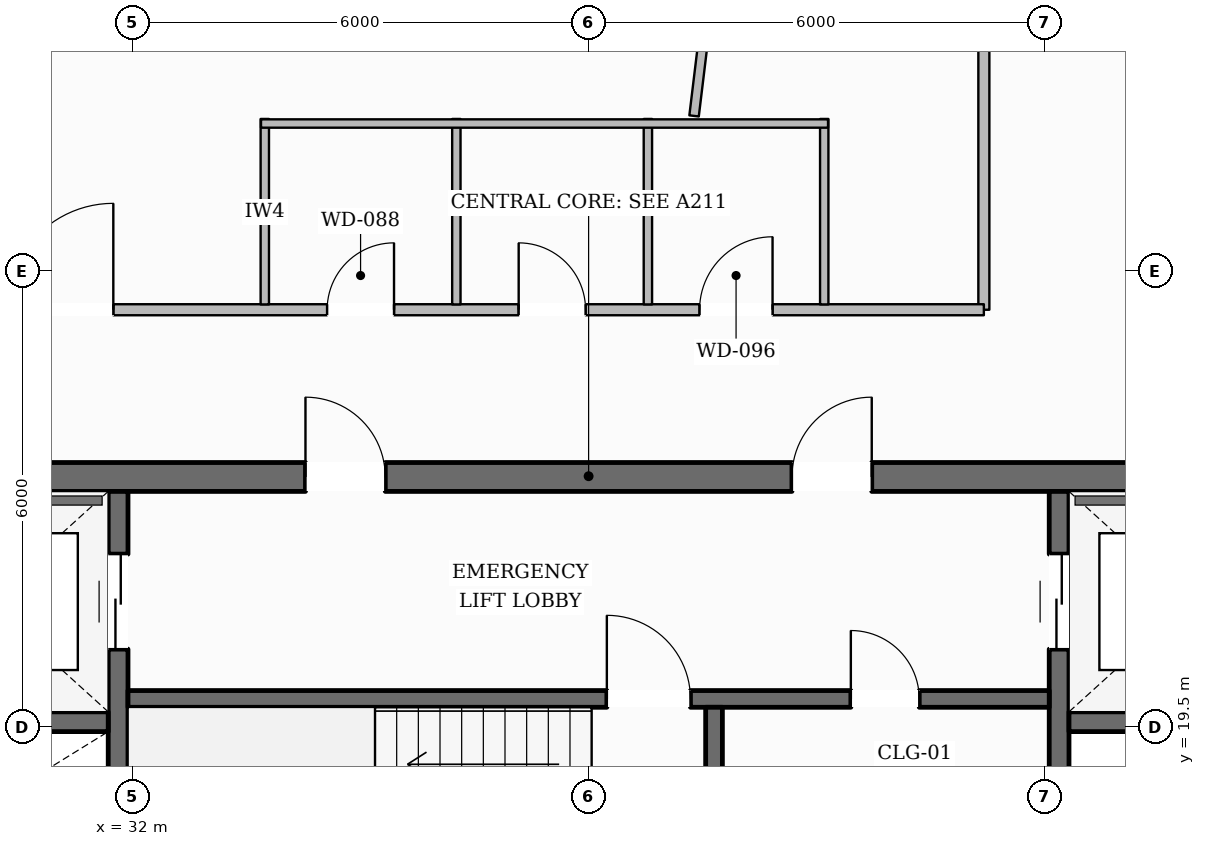
"""IFC4 building model, lengths in metres.
Left out: names, types, materials, properties, quantities, classifications, styles, units other than length and angle.
Written with IfcOpenShell. Run it as: python <this file> out.ifc"""

import sys

from ifc_helpers import new_model, si_unit, direction, frame, frame_2d, origin, place, context, subcontext, project, spatial, rectangle, extrude, element, fill, save


model = new_model("IFC4")
c1 = context("Model", 3, precision=1e-05, world=origin(), true_north=direction((0.0, 1.0)))
c2 = subcontext(c1, "Body", "Model", "MODEL_VIEW")
j1 = project(units=[si_unit("LENGTHUNIT", "METRE"), si_unit("PLANEANGLEUNIT", "RADIAN")], contexts=[c1])
p1 = place(None, origin())
s1 = spatial("IfcSite", under=j1, at=p1, CompositionType="ELEMENT")
p2 = place(p1, origin())
s2 = spatial("IfcBuilding", under=s1, at=p2, CompositionType="ELEMENT")
p3 = place(p2, frame((0.0, 0.0, 251.05)))
s3 = spatial("IfcBuildingStorey", under=s2, at=p3, CompositionType="ELEMENT", Elevation=251.05)
p4 = place(p3, frame((28.1, 22.79, 0.0), z_axis=(0.0, 0.0, 1.0), x_axis=(1.0, 0.0, 0.0)))
e1 = element("IfcWall", 1, at=p4, inside=s3, PredefinedType="SOLIDWALL", context=c2, shape_type="SweptSolid", body=[
    extrude(rectangle(XDim=19.8, YDim=0.38, at=frame_2d((9.9, 0.0))), origin(), (0.0, 0.0, 1.0), 3.61),
])
p5 = place(p4, frame((6.175, 0.0, 0.0)))
e2 = element("IfcOpeningElement", 2, at=p5, cuts=e1, PredefinedType="OPENING", context=c2, shape_type="SweptSolid", body=[
    extrude(rectangle(XDim=1.05, YDim=2.15, at=frame_2d((0.525, 1.075))), frame((0.0, 0.2, 0.0), z_axis=(0.0, -1.0, 0.0), x_axis=(1.0, 0.0, 0.0)), (0.0, 0.0, 1.0), 0.4),
])
p6 = place(p4, frame((12.575, 0.0, 0.0)))
e3 = element("IfcOpeningElement", 3, at=p6, cuts=e1, PredefinedType="OPENING", context=c2, shape_type="SweptSolid", body=[
    extrude(rectangle(XDim=1.05, YDim=2.15, at=frame_2d((0.525, 1.075))), frame((0.0, 0.2, 0.0), z_axis=(0.0, -1.0, 0.0), x_axis=(1.0, 0.0, 0.0)), (0.0, 0.0, 1.0), 0.4),
])
p7 = place(p3, frame((31.81, 9.6, 0.0), z_axis=(0.0, 0.0, 1.0), x_axis=(0.0, 1.0, 0.0)))
e4 = element("IfcWall", 4, at=p7, inside=s3, PredefinedType="SHEAR", context=c2, shape_type="SweptSolid", body=[
    extrude(rectangle(XDim=13.0, YDim=0.26, at=frame_2d((6.5, 0.0))), origin(), (0.0, 0.0, 1.0), 3.61),
])
p8 = place(p7, frame((10.925, 0.0, 0.0)))
e5 = element("IfcOpeningElement", 5, at=p8, cuts=e4, PredefinedType="OPENING", context=c2, shape_type="SweptSolid", body=[
    extrude(rectangle(XDim=1.25, YDim=2.25, at=frame_2d((0.625, 1.125))), frame((0.0, 0.14, 0.0), z_axis=(0.0, -1.0, 0.0), x_axis=(1.0, 0.0, 0.0)), (0.0, 0.0, 1.0), 0.28),
])
p9 = place(p3, frame((44.19, 9.6, 0.0), z_axis=(0.0, 0.0, 1.0), x_axis=(0.0, 1.0, 0.0)))
e6 = element("IfcWall", 6, at=p9, inside=s3, PredefinedType="SHEAR", context=c2, shape_type="SweptSolid", body=[
    extrude(rectangle(XDim=13.0, YDim=0.26, at=frame_2d((6.5, 0.0))), origin(), (0.0, 0.0, 1.0), 3.61),
])
p10 = place(p9, frame((10.925, 0.0, 0.0)))
e7 = element("IfcOpeningElement", 7, at=p10, cuts=e6, PredefinedType="OPENING", context=c2, shape_type="SweptSolid", body=[
    extrude(rectangle(XDim=1.25, YDim=2.25, at=frame_2d((0.625, 1.125))), frame((0.0, 0.14, 0.0), z_axis=(0.0, -1.0, 0.0), x_axis=(1.0, 0.0, 0.0)), (0.0, 0.0, 1.0), 0.28),
])
for number, where, z_axis, x_axis in (
    (8, (28.48, 19.57, 0.0), (0.0, 0.0, 1.0), (1.0, 0.0, 0.0)),
    (9, (44.32, 19.57, 0.0), (0.0, 0.0, 1.0), (1.0, 0.0, 0.0)),
):
    element("IfcWall", number, at=place(p3, frame(where, z_axis=z_axis, x_axis=x_axis)), inside=s3, PredefinedType="SHEAR", context=c2, shape_type="SweptSolid", body=[
        extrude(rectangle(XDim=3.2, YDim=0.26, at=frame_2d((1.6, 0.0))), origin(), (0.0, 0.0, 1.0), 3.61),
    ])
p11 = place(p3, frame((31.94, 19.87, 0.0), z_axis=(0.0, 0.0, 1.0), x_axis=(1.0, 0.0, 0.0)))
e10 = element("IfcWall", 10, at=p11, inside=s3, PredefinedType="SOLIDWALL", context=c2, shape_type="SweptSolid", body=[
    extrude(rectangle(XDim=12.12, YDim=0.22, at=frame_2d((6.06, 0.0))), origin(), (0.0, 0.0, 1.0), 3.61),
])
p12 = place(p11, frame((6.3, 0.0, 0.0)))
e11 = element("IfcOpeningElement", 11, at=p12, cuts=e10, PredefinedType="OPENING", context=c2, shape_type="SweptSolid", body=[
    extrude(rectangle(XDim=1.1, YDim=2.15, at=frame_2d((0.55, 1.075))), frame((0.0, 0.12, 0.0), z_axis=(0.0, -1.0, 0.0), x_axis=(1.0, 0.0, 0.0)), (0.0, 0.0, 1.0), 0.24),
])
p13 = place(p11, frame((9.51, 0.0, 0.0)))
e12 = element("IfcOpeningElement", 12, at=p13, cuts=e10, PredefinedType="OPENING", context=c2, shape_type="SweptSolid", body=[
    extrude(rectangle(XDim=0.9, YDim=2.1, at=frame_2d((0.45, 1.05))), frame((0.0, 0.12, 0.0), z_axis=(0.0, -1.0, 0.0), x_axis=(1.0, 0.0, 0.0)), (0.0, 0.0, 1.0), 0.24),
])
p14 = place(p3, frame((39.65, 16.56, 0.0), z_axis=(0.0, 0.0, 1.0), x_axis=(0.0, 1.0, 0.0)))
e13 = element("IfcWall", 13, at=p14, inside=s3, PredefinedType="SOLIDWALL", context=c2, shape_type="SweptSolid", body=[
    extrude(rectangle(XDim=3.2, YDim=0.22, at=frame_2d((1.6, 0.0))), origin(), (0.0, 0.0, 1.0), 3.61),
])
p15 = place(p3, frame((16.214, 11.135, 0.0), z_axis=(0.0, 0.0, 1.0), x_axis=(0.49510347201, 0.868834018673, 0.0)))
e14 = element("IfcWall", 14, at=p15, inside=s3, PredefinedType="STANDARD", context=c2, shape_type="SweptSolid", body=[
    extrude(rectangle(XDim=37.643, YDim=0.35, at=frame_2d((18.822, 0.0))), origin(), (0.0, 0.0, 1.0), 3.196),
])
p16 = place(p15, frame((33.429, 0.0, 0.65)))
e15 = element("IfcOpeningElement", 15, at=p16, cuts=e14, PredefinedType="OPENING", context=c2, shape_type="SweptSolid", body=[
    extrude(rectangle(XDim=1.35, YDim=1.75, at=frame_2d((0.675, 0.875))), frame((0.0, 0.185, 0.0), z_axis=(0.0, -1.0, 0.0), x_axis=(1.0, 0.0, 0.0)), (0.0, 0.0, 1.0), 0.37),
])
p17 = place(p15, frame((27.315, 0.0, 0.65)))
e16 = element("IfcOpeningElement", 16, at=p17, cuts=e14, PredefinedType="OPENING", context=c2, shape_type="SweptSolid", body=[
    extrude(rectangle(XDim=1.35, YDim=1.75, at=frame_2d((0.675, 0.875))), frame((0.0, 0.185, 0.0), z_axis=(0.0, -1.0, 0.0), x_axis=(1.0, 0.0, 0.0)), (0.0, 0.0, 1.0), 0.37),
])
p18 = place(p15, frame((15.087, 0.0, 0.65)))
e17 = element("IfcOpeningElement", 17, at=p18, cuts=e14, PredefinedType="OPENING", context=c2, shape_type="SweptSolid", body=[
    extrude(rectangle(XDim=1.35, YDim=1.75, at=frame_2d((0.675, 0.875))), frame((0.0, 0.185, 0.0), z_axis=(0.0, -1.0, 0.0), x_axis=(1.0, 0.0, 0.0)), (0.0, 0.0, 1.0), 0.37),
])
p19 = place(p15, frame((8.973, 0.0, 0.65)))
e18 = element("IfcOpeningElement", 18, at=p19, cuts=e14, PredefinedType="OPENING", context=c2, shape_type="SweptSolid", body=[
    extrude(rectangle(XDim=1.35, YDim=1.75, at=frame_2d((0.675, 0.875))), frame((0.0, 0.185, 0.0), z_axis=(0.0, -1.0, 0.0), x_axis=(1.0, 0.0, 0.0)), (0.0, 0.0, 1.0), 0.37),
])
p20 = place(p15, frame((2.859, 0.0, 0.65)))
e19 = element("IfcOpeningElement", 19, at=p20, cuts=e14, PredefinedType="OPENING", context=c2, shape_type="SweptSolid", body=[
    extrude(rectangle(XDim=1.35, YDim=1.75, at=frame_2d((0.675, 0.875))), frame((0.0, 0.185, 0.0), z_axis=(0.0, -1.0, 0.0), x_axis=(1.0, 0.0, 0.0)), (0.0, 0.0, 1.0), 0.37),
])
p21 = place(p3, frame((41.284, 43.76, 0.0), z_axis=(0.0, 0.0, 1.0), x_axis=(0.50479404613, -0.863239810824, 0.0)))
e20 = element("IfcWall", 20, at=p21, inside=s3, PredefinedType="STANDARD", context=c2, shape_type="SweptSolid", body=[
    extrude(rectangle(XDim=38.372, YDim=0.35, at=frame_2d((19.186, 0.0))), origin(), (0.0, 0.0, 1.0), 3.196),
])
p22 = place(p21, frame((34.102, 0.0, 0.65)))
e21 = element("IfcOpeningElement", 21, at=p22, cuts=e20, PredefinedType="OPENING", context=c2, shape_type="SweptSolid", body=[
    extrude(rectangle(XDim=1.35, YDim=1.75, at=frame_2d((0.675, 0.875))), frame((0.0, 0.185, 0.0), z_axis=(0.0, -1.0, 0.0), x_axis=(1.0, 0.0, 0.0)), (0.0, 0.0, 1.0), 0.37),
])
p23 = place(p21, frame((27.864, 0.0, 0.65)))
e22 = element("IfcOpeningElement", 22, at=p23, cuts=e20, PredefinedType="OPENING", context=c2, shape_type="SweptSolid", body=[
    extrude(rectangle(XDim=1.35, YDim=1.75, at=frame_2d((0.675, 0.875))), frame((0.0, 0.185, 0.0), z_axis=(0.0, -1.0, 0.0), x_axis=(1.0, 0.0, 0.0)), (0.0, 0.0, 1.0), 0.37),
])
p24 = place(p21, frame((15.39, 0.0, 0.65)))
e23 = element("IfcOpeningElement", 23, at=p24, cuts=e20, PredefinedType="OPENING", context=c2, shape_type="SweptSolid", body=[
    extrude(rectangle(XDim=1.35, YDim=1.75, at=frame_2d((0.675, 0.875))), frame((0.0, 0.185, 0.0), z_axis=(0.0, -1.0, 0.0), x_axis=(1.0, 0.0, 0.0)), (0.0, 0.0, 1.0), 0.37),
])
p25 = place(p21, frame((9.153, 0.0, 0.65)))
e24 = element("IfcOpeningElement", 24, at=p25, cuts=e20, PredefinedType="OPENING", context=c2, shape_type="SweptSolid", body=[
    extrude(rectangle(XDim=1.35, YDim=1.75, at=frame_2d((0.675, 0.875))), frame((0.0, 0.185, 0.0), z_axis=(0.0, -1.0, 0.0), x_axis=(1.0, 0.0, 0.0)), (0.0, 0.0, 1.0), 0.37),
])
p26 = place(p21, frame((2.915, 0.0, 0.65)))
e25 = element("IfcOpeningElement", 25, at=p26, cuts=e20, PredefinedType="OPENING", context=c2, shape_type="SweptSolid", body=[
    extrude(rectangle(XDim=1.35, YDim=1.75, at=frame_2d((0.675, 0.875))), frame((0.0, 0.185, 0.0), z_axis=(0.0, -1.0, 0.0), x_axis=(1.0, 0.0, 0.0)), (0.0, 0.0, 1.0), 0.37),
])
p27 = place(p3, frame((43.2, 24.99, 0.0), z_axis=(0.0, 0.0, 1.0), x_axis=(0.0, 1.0, 0.0)))
e26 = element("IfcWall", 26, at=p27, inside=s3, PredefinedType="PARTITIONING", context=c2, shape_type="SweptSolid", body=[
    extrude(rectangle(XDim=9.41, YDim=0.145, at=frame_2d((4.705, 0.0))), origin(), (0.0, 0.0, 1.0), 3.61),
])
p28 = place(p27, frame((4.005, 0.0, 0.0)))
e27 = element("IfcOpeningElement", 27, at=p28, cuts=e26, PredefinedType="OPENING", context=c2, shape_type="SweptSolid", body=[
    extrude(rectangle(XDim=1.4, YDim=2.2, at=frame_2d((0.7, 1.1))), frame((0.0, 0.083, 0.0), z_axis=(0.0, -1.0, 0.0), x_axis=(1.0, 0.0, 0.0)), (0.0, 0.0, 1.0), 0.165),
])
p29 = place(p3, frame((26.09, 24.99, 0.0), z_axis=(0.0, 0.0, 1.0), x_axis=(1.0, 0.0, 0.0)))
e28 = element("IfcWall", 28, at=p29, inside=s3, PredefinedType="PARTITIONING", context=c2, shape_type="SweptSolid", body=[
    extrude(rectangle(XDim=17.11, YDim=0.145, at=frame_2d((8.555, 0.0))), origin(), (0.0, 0.0, 1.0), 3.61),
])
p30 = place(p29, frame((8.47, 0.0, 0.0)))
e29 = element("IfcOpeningElement", 29, at=p30, cuts=e28, PredefinedType="OPENING", context=c2, shape_type="SweptSolid", body=[
    extrude(rectangle(XDim=0.88, YDim=2.1, at=frame_2d((0.44, 1.05))), frame((0.0, 0.083, 0.0), z_axis=(0.0, -1.0, 0.0), x_axis=(1.0, 0.0, 0.0)), (0.0, 0.0, 1.0), 0.165),
])
p31 = place(p29, frame((10.99, 0.0, 0.0)))
e30 = element("IfcOpeningElement", 30, at=p31, cuts=e28, PredefinedType="OPENING", context=c2, shape_type="SweptSolid", body=[
    extrude(rectangle(XDim=0.88, YDim=2.1, at=frame_2d((0.44, 1.05))), frame((0.0, 0.083, 0.0), z_axis=(0.0, -1.0, 0.0), x_axis=(1.0, 0.0, 0.0)), (0.0, 0.0, 1.0), 0.165),
])
p32 = place(p29, frame((13.37, 0.0, 0.0)))
e31 = element("IfcOpeningElement", 31, at=p32, cuts=e28, PredefinedType="OPENING", context=c2, shape_type="SweptSolid", body=[
    extrude(rectangle(XDim=0.96, YDim=2.1, at=frame_2d((0.48, 1.05))), frame((0.0, 0.083, 0.0), z_axis=(0.0, -1.0, 0.0), x_axis=(1.0, 0.0, 0.0)), (0.0, 0.0, 1.0), 0.165),
])
p33 = place(p29, frame((4.257, 0.0, 0.0)))
e32 = element("IfcOpeningElement", 32, at=p33, cuts=e28, PredefinedType="OPENING", context=c2, shape_type="SweptSolid", body=[
    extrude(rectangle(XDim=1.4, YDim=2.2, at=frame_2d((0.7, 1.1))), frame((0.0, 0.083, 0.0), z_axis=(0.0, -1.0, 0.0), x_axis=(1.0, 0.0, 0.0)), (0.0, 0.0, 1.0), 0.165),
])
for number, where, z_axis, x_axis in (
    (33, (33.74, 25.06, 0.0), (0.0, 0.0, 1.0), (0.0, 1.0, 0.0)),
    (34, (36.26, 25.06, 0.0), (0.0, 0.0, 1.0), (0.0, 1.0, 0.0)),
    (35, (38.78, 25.06, 0.0), (0.0, 0.0, 1.0), (0.0, 1.0, 0.0)),
    (36, (41.1, 25.06, 0.0), (0.0, 0.0, 1.0), (0.0, 1.0, 0.0)),
):
    element("IfcWall", number, at=place(p3, frame(where, z_axis=z_axis, x_axis=x_axis)), inside=s3, PredefinedType="PLUMBINGWALL", context=c2, shape_type="SweptSolid", body=[
        extrude(rectangle(XDim=2.44, YDim=0.11, at=frame_2d((1.22, 0.0))), origin(), (0.0, 0.0, 1.0), 3.61),
    ])
p34 = place(p3, frame((33.69, 27.44, 0.0), z_axis=(0.0, 0.0, 1.0), x_axis=(1.0, 0.0, 0.0)))
e37 = element("IfcWall", 37, at=p34, inside=s3, PredefinedType="PLUMBINGWALL", context=c2, shape_type="SweptSolid", body=[
    extrude(rectangle(XDim=7.46, YDim=0.11, at=frame_2d((3.73, 0.0))), origin(), (0.0, 0.0, 1.0), 3.61),
])
p35 = place(p3, frame((39.387, 27.54, 0.0), z_axis=(0.0, 0.0, 1.0), x_axis=(0.12041169592, 0.99272404196, 0.0)))
e38 = element("IfcWall", 38, at=p35, inside=s3, PredefinedType="PARTITIONING", context=c2, shape_type="SweptSolid", body=[
    extrude(rectangle(XDim=15.521, YDim=0.125, at=frame_2d((7.76, 0.0))), origin(), (0.0, 0.0, 1.0), 3.246),
])
p36 = place(p12, origin())
e39 = element("IfcDoor", 39, at=p36, inside=s3, OperationType="SINGLE_SWING_LEFT", PredefinedType="DOOR", context=c2, shape_type="SweptSolid", body=[
    extrude(rectangle(XDim=1.1, YDim=2.15, at=frame_2d((0.55, 1.075))), frame((0.0, 0.025, 0.0), z_axis=(0.0, -1.0, 0.0), x_axis=(1.0, 0.0, 0.0)), (0.0, 0.0, 1.0), 0.05),
])
fill(e11, e39)
p37 = place(p5, origin())
e40 = element("IfcDoor", 40, at=p37, inside=s3, OperationType="SINGLE_SWING_LEFT", PredefinedType="DOOR", context=c2, shape_type="SweptSolid", body=[
    extrude(rectangle(XDim=1.05, YDim=2.15, at=frame_2d((0.525, 1.075))), frame((0.0, 0.025, 0.0), z_axis=(0.0, -1.0, 0.0), x_axis=(1.0, 0.0, 0.0)), (0.0, 0.0, 1.0), 0.05),
])
fill(e2, e40)
p38 = place(p6, origin())
e41 = element("IfcDoor", 41, at=p38, inside=s3, OperationType="SINGLE_SWING_RIGHT", PredefinedType="DOOR", context=c2, shape_type="SweptSolid", body=[
    extrude(rectangle(XDim=1.05, YDim=2.15, at=frame_2d((0.525, 1.075))), frame((0.0, 0.025, 0.0), z_axis=(0.0, -1.0, 0.0), x_axis=(1.0, 0.0, 0.0)), (0.0, 0.0, 1.0), 0.05),
])
fill(e3, e41)
p39 = place(p8, origin())
e42 = element("IfcDoor", 42, at=p39, inside=s3, OperationType="DOUBLE_DOOR_SLIDING", PredefinedType="DOOR", context=c2, shape_type="SweptSolid", body=[
    extrude(rectangle(XDim=1.25, YDim=2.25, at=frame_2d((0.625, 1.125))), frame((0.0, 0.025, 0.0), z_axis=(0.0, -1.0, 0.0), x_axis=(1.0, 0.0, 0.0)), (0.0, 0.0, 1.0), 0.05),
])
fill(e5, e42)
p40 = place(p10, origin())
e43 = element("IfcDoor", 43, at=p40, inside=s3, OperationType="DOUBLE_DOOR_SLIDING", PredefinedType="DOOR", context=c2, shape_type="SweptSolid", body=[
    extrude(rectangle(XDim=1.25, YDim=2.25, at=frame_2d((0.625, 1.125))), frame((0.0, 0.025, 0.0), z_axis=(0.0, -1.0, 0.0), x_axis=(1.0, 0.0, 0.0)), (0.0, 0.0, 1.0), 0.05),
])
fill(e7, e43)
p41 = place(p13, origin())
e44 = element("IfcDoor", 44, at=p41, inside=s3, OperationType="SINGLE_SWING_LEFT", PredefinedType="DOOR", context=c2, shape_type="SweptSolid", body=[
    extrude(rectangle(XDim=0.9, YDim=2.1, at=frame_2d((0.45, 1.05))), frame((0.0, 0.025, 0.0), z_axis=(0.0, -1.0, 0.0), x_axis=(1.0, 0.0, 0.0)), (0.0, 0.0, 1.0), 0.05),
])
fill(e12, e44)
p42 = place(p30, origin())
e45 = element("IfcDoor", 45, at=p42, inside=s3, OperationType="SINGLE_SWING_RIGHT", PredefinedType="DOOR", context=c2, shape_type="SweptSolid", body=[
    extrude(rectangle(XDim=0.88, YDim=2.1, at=frame_2d((0.44, 1.05))), frame((0.0, 0.025, 0.0), z_axis=(0.0, -1.0, 0.0), x_axis=(1.0, 0.0, 0.0)), (0.0, 0.0, 1.0), 0.05),
])
fill(e29, e45)
p43 = place(p31, origin())
e46 = element("IfcDoor", 46, at=p43, inside=s3, OperationType="SINGLE_SWING_LEFT", PredefinedType="DOOR", context=c2, shape_type="SweptSolid", body=[
    extrude(rectangle(XDim=0.88, YDim=2.1, at=frame_2d((0.44, 1.05))), frame((0.0, 0.025, 0.0), z_axis=(0.0, -1.0, 0.0), x_axis=(1.0, 0.0, 0.0)), (0.0, 0.0, 1.0), 0.05),
])
fill(e30, e46)
p44 = place(p32, origin())
e47 = element("IfcDoor", 47, at=p44, inside=s3, OperationType="SINGLE_SWING_RIGHT", PredefinedType="DOOR", context=c2, shape_type="SweptSolid", body=[
    extrude(rectangle(XDim=0.96, YDim=2.1, at=frame_2d((0.48, 1.05))), frame((0.0, 0.025, 0.0), z_axis=(0.0, -1.0, 0.0), x_axis=(1.0, 0.0, 0.0)), (0.0, 0.0, 1.0), 0.05),
])
fill(e31, e47)
p45 = place(p33, origin())
e48 = element("IfcDoor", 48, at=p45, inside=s3, OperationType="SINGLE_SWING_RIGHT", PredefinedType="DOOR", context=c2, shape_type="SweptSolid", body=[
    extrude(rectangle(XDim=1.4, YDim=2.2, at=frame_2d((0.7, 1.1))), frame((0.0, 0.025, 0.0), z_axis=(0.0, -1.0, 0.0), x_axis=(1.0, 0.0, 0.0)), (0.0, 0.0, 1.0), 0.05),
])
fill(e32, e48)
save(model, sys.argv[1])
